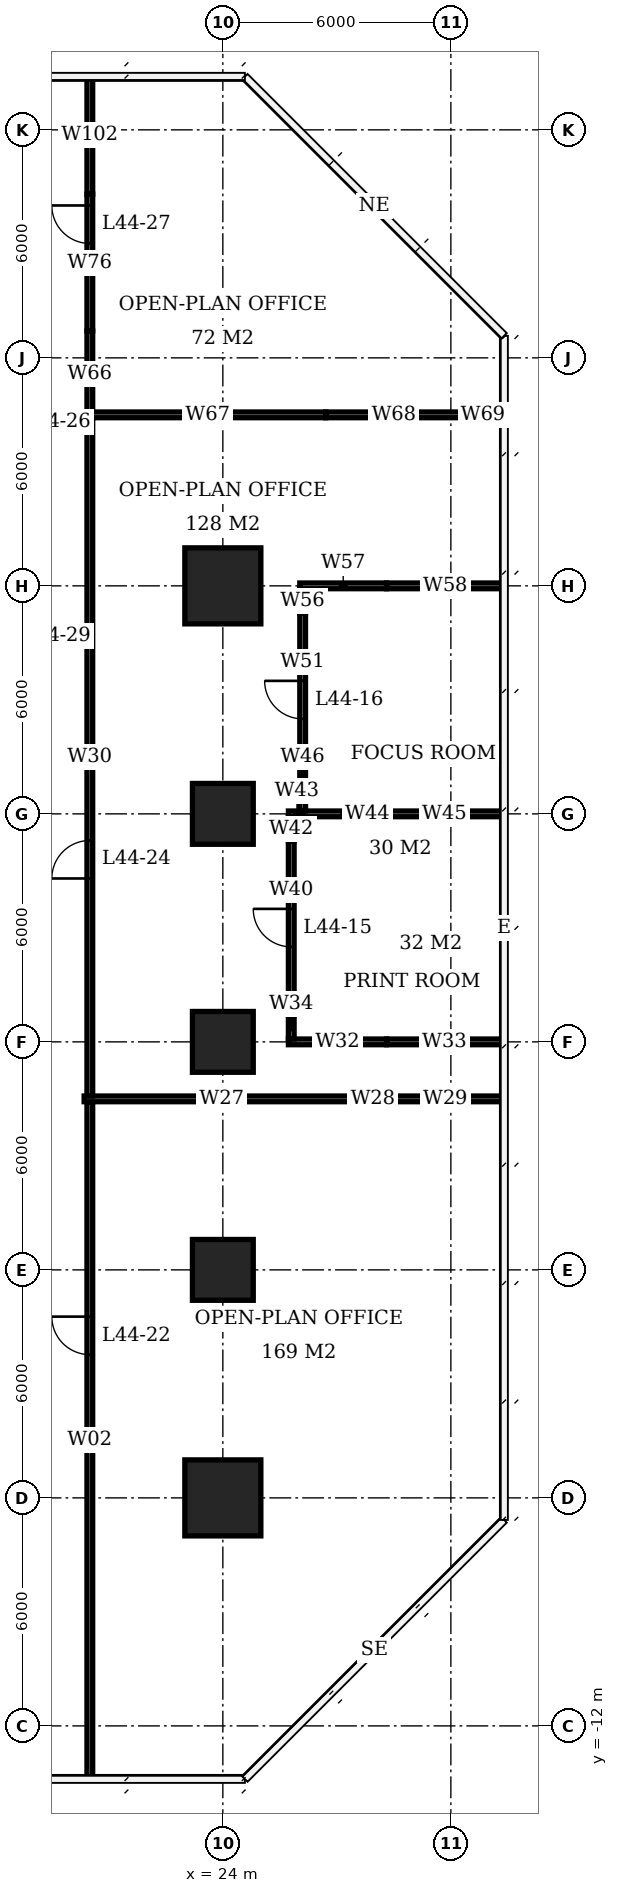
"""IFC4 building model, lengths in metres.
Left out: names, types, materials, properties, quantities, classifications, styles, units other than length and angle.
Written with IfcOpenShell. Run it as: python <this file> out.ifc"""

import sys

from ifc_helpers import new_model, si_unit, direction, frame, frame_2d, origin, origin_2d, place, context, subcontext, project, spatial, rectangle, extrude, element, fill, save


model = new_model("IFC4")
c1 = context("Model", 3, precision=1e-05, world=origin(), true_north=direction((0.0, 1.0)))
c2 = subcontext(c1, "Body", "Model", "MODEL_VIEW")
j1 = project(units=[si_unit("LENGTHUNIT", "METRE"), si_unit("PLANEANGLEUNIT", "RADIAN")], contexts=[c1])
p1 = place(None, origin())
s1 = spatial("IfcSite", under=j1, at=p1, CompositionType="ELEMENT")
p2 = place(p1, origin())
s2 = spatial("IfcBuilding", under=s1, at=p2, CompositionType="ELEMENT")
p3 = place(p2, frame((0.0, 0.0, 181.1)))
s3 = spatial("IfcBuildingStorey", under=s2, at=p3, CompositionType="ELEMENT", Elevation=181.1)
p4 = place(p3, frame((24.0, -6.0, 0.0), z_axis=(0.0, 0.0, 1.0), x_axis=(1.0, 0.0, 0.0)))
e1 = element("IfcColumn", 1, at=p4, inside=s3, PredefinedType="COLUMN", context=c2, shape_type="SweptSolid", body=[
    extrude(rectangle(XDim=2.0, YDim=2.0, at=origin_2d()), origin(), (0.0, 0.0, 1.0), 3.9),
])
for number, where, z_axis, x_axis in (
    (2, (24.0, 0.0, 0.0), (0.0, 0.0, 1.0), (1.0, 0.0, 0.0)),
    (3, (24.0, 6.0, 0.0), (0.0, 0.0, 1.0), (1.0, 0.0, 0.0)),
    (4, (24.0, 12.0, 0.0), (0.0, 0.0, 1.0), (1.0, 0.0, 0.0)),
):
    element("IfcColumn", number, at=place(p3, frame(where, z_axis=z_axis, x_axis=x_axis)), inside=s3, PredefinedType="COLUMN", context=c2, shape_type="SweptSolid", body=[
        extrude(rectangle(XDim=1.6, YDim=1.6, at=origin_2d()), origin(), (0.0, 0.0, 1.0), 3.9),
    ])
p5 = place(p3, frame((24.0, 18.0, 0.0), z_axis=(0.0, 0.0, 1.0), x_axis=(1.0, 0.0, 0.0)))
e5 = element("IfcColumn", 5, at=p5, inside=s3, PredefinedType="COLUMN", context=c2, shape_type="SweptSolid", body=[
    extrude(rectangle(XDim=2.0, YDim=2.0, at=origin_2d()), origin(), (0.0, 0.0, 1.0), 3.9),
])
p6 = place(p3, frame((25.725, 6.0, 0.0), z_axis=(0.0, 0.0, 1.0), x_axis=(1.0, 0.0, 0.0)))
e6 = element("IfcWall", 6, at=p6, inside=s3, PredefinedType="PARTITIONING", context=c2, shape_type="SweptSolid", body=[
    extrude(rectangle(XDim=2.585, YDim=0.15, at=frame_2d((1.292, 0.0))), origin(), (0.0, 0.0, 1.0), 2.65),
])
p7 = place(p3, frame((28.31, 6.0, 0.0), z_axis=(0.0, 0.0, 1.0), x_axis=(1.0, 0.0, 0.0)))
e7 = element("IfcWall", 7, at=p7, inside=s3, PredefinedType="PARTITIONING", context=c2, shape_type="SweptSolid", body=[
    extrude(rectangle(XDim=3.04, YDim=0.15, at=frame_2d((1.52, 0.0))), origin(), (0.0, 0.0, 1.0), 3.65),
])
p8 = place(p3, frame((25.725, 12.0, 0.0), z_axis=(0.0, 0.0, 1.0), x_axis=(1.0, 0.0, 0.0)))
e8 = element("IfcWall", 8, at=p8, inside=s3, PredefinedType="PARTITIONING", context=c2, shape_type="SweptSolid", body=[
    extrude(rectangle(XDim=0.45, YDim=0.15, at=frame_2d((0.225, 0.0))), origin(), (0.0, 0.0, 1.0), 2.65),
])
p9 = place(p3, frame((26.1, 12.0, 0.0), z_axis=(0.0, 0.0, 1.0), x_axis=(1.0, 0.0, 0.0)))
e9 = element("IfcWall", 9, at=p9, inside=s3, PredefinedType="PARTITIONING", context=c2, shape_type="SweptSolid", body=[
    extrude(rectangle(XDim=2.21, YDim=0.15, at=frame_2d((1.105, 0.0))), origin(), (0.0, 0.0, 1.0), 2.65),
])
p10 = place(p3, frame((28.31, 12.0, 0.0), z_axis=(0.0, 0.0, 1.0), x_axis=(1.0, 0.0, 0.0)))
e10 = element("IfcWall", 10, at=p10, inside=s3, PredefinedType="PARTITIONING", context=c2, shape_type="SweptSolid", body=[
    extrude(rectangle(XDim=3.04, YDim=0.15, at=frame_2d((1.52, 0.0))), origin(), (0.0, 0.0, 1.0), 3.65),
])
p11 = place(p3, frame((26.025, 18.0, 0.0), z_axis=(0.0, 0.0, 1.0), x_axis=(1.0, 0.0, 0.0)))
e11 = element("IfcWall", 11, at=p11, inside=s3, PredefinedType="PARTITIONING", context=c2, shape_type="SweptSolid", body=[
    extrude(rectangle(XDim=2.285, YDim=0.15, at=frame_2d((1.143, 0.0))), origin(), (0.0, 0.0, 1.0), 2.65),
])
p12 = place(p3, frame((28.31, 18.0, 0.0), z_axis=(0.0, 0.0, 1.0), x_axis=(1.0, 0.0, 0.0)))
e12 = element("IfcWall", 12, at=p12, inside=s3, PredefinedType="PARTITIONING", context=c2, shape_type="SweptSolid", body=[
    extrude(rectangle(XDim=3.09, YDim=0.15, at=frame_2d((1.545, 0.0))), origin(), (0.0, 0.0, 1.0), 3.65),
])
p13 = place(p3, frame((25.8, 6.075, 0.0), z_axis=(0.0, 0.0, 1.0), x_axis=(0.0, 1.0, 0.0)))
e13 = element("IfcWall", 13, at=p13, inside=s3, PredefinedType="PARTITIONING", context=c2, shape_type="SweptSolid", body=[
    extrude(rectangle(XDim=0.635, YDim=0.15, at=frame_2d((0.317, 0.0))), origin(), (0.0, 0.0, 1.0), 2.65),
])
p14 = place(p3, frame((25.8, 6.71, 0.0), z_axis=(0.0, 0.0, 1.0), x_axis=(0.0, 1.0, 0.0)))
e14 = element("IfcWall", 14, at=p14, inside=s3, PredefinedType="PARTITIONING", context=c2, shape_type="SweptSolid", body=[
    extrude(rectangle(XDim=4.58, YDim=0.15, at=frame_2d((2.29, 0.0))), origin(), (0.0, 0.0, 1.0), 3.65),
])
p15 = place(p14, frame((1.79, 0.0, 0.0)))
e15 = element("IfcOpeningElement", 15, at=p15, cuts=e14, PredefinedType="OPENING", context=c2, shape_type="SweptSolid", body=[
    extrude(rectangle(XDim=1.0, YDim=2.1, at=frame_2d((0.5, 1.05))), frame((0.0, 0.085, 0.0), z_axis=(0.0, -1.0, 0.0), x_axis=(1.0, 0.0, 0.0)), (0.0, 0.0, 1.0), 0.17),
])
for number, where, z_axis, x_axis in (
    (16, (25.8, 11.29, 0.0), (0.0, 0.0, 1.0), (0.0, 1.0, 0.0)),
    (17, (26.1, 12.075, 0.0), (0.0, 0.0, 1.0), (0.0, 1.0, 0.0)),
):
    element("IfcWall", number, at=place(p3, frame(where, z_axis=z_axis, x_axis=x_axis)), inside=s3, PredefinedType="PARTITIONING", context=c2, shape_type="SweptSolid", body=[
        extrude(rectangle(XDim=0.635, YDim=0.15, at=frame_2d((0.317, 0.0))), origin(), (0.0, 0.0, 1.0), 2.65),
    ])
p16 = place(p3, frame((26.1, 12.71, 0.0), z_axis=(0.0, 0.0, 1.0), x_axis=(0.0, 1.0, 0.0)))
e18 = element("IfcWall", 18, at=p16, inside=s3, PredefinedType="PARTITIONING", context=c2, shape_type="SweptSolid", body=[
    extrude(rectangle(XDim=4.58, YDim=0.15, at=frame_2d((2.29, 0.0))), origin(), (0.0, 0.0, 1.0), 3.65),
])
p17 = place(p16, frame((1.79, 0.0, 0.0)))
e19 = element("IfcOpeningElement", 19, at=p17, cuts=e18, PredefinedType="OPENING", context=c2, shape_type="SweptSolid", body=[
    extrude(rectangle(XDim=1.0, YDim=2.1, at=frame_2d((0.5, 1.05))), frame((0.0, 0.085, 0.0), z_axis=(0.0, -1.0, 0.0), x_axis=(1.0, 0.0, 0.0)), (0.0, 0.0, 1.0), 0.17),
])
p18 = place(p3, frame((26.1, 17.29, 0.0), z_axis=(0.0, 0.0, 1.0), x_axis=(0.0, 1.0, 0.0)))
e20 = element("IfcWall", 20, at=p18, inside=s3, PredefinedType="PARTITIONING", context=c2, shape_type="SweptSolid", body=[
    extrude(rectangle(XDim=0.635, YDim=0.15, at=frame_2d((0.317, 0.0))), origin(), (0.0, 0.0, 1.0), 2.65),
])
p19 = place(p3, frame((20.5, -13.4, 0.0), z_axis=(0.0, 0.0, 1.0), x_axis=(0.0, 1.0, 0.0)))
e21 = element("IfcWall", 21, at=p19, inside=s3, PredefinedType="PARTITIONING", context=c2, shape_type="SweptSolid", body=[
    extrude(rectangle(XDim=17.825, YDim=0.15, at=frame_2d((8.913, 0.0))), origin(), (0.0, 0.0, 1.0), 3.65),
])
p20 = place(p19, frame((11.17, 0.0, 0.0)))
e22 = element("IfcOpeningElement", 22, at=p20, cuts=e21, PredefinedType="OPENING", context=c2, shape_type="SweptSolid", body=[
    extrude(rectangle(XDim=1.0, YDim=2.1, at=frame_2d((0.5, 1.05))), frame((0.0, 0.085, 0.0), z_axis=(0.0, -1.0, 0.0), x_axis=(1.0, 0.0, 0.0)), (0.0, 0.0, 1.0), 0.17),
])
p21 = place(p3, frame((20.5, 4.575, 0.0), z_axis=(0.0, 0.0, 1.0), x_axis=(0.0, 1.0, 0.0)))
e23 = element("IfcWall", 23, at=p21, inside=s3, PredefinedType="PARTITIONING", context=c2, shape_type="SweptSolid", body=[
    extrude(rectangle(XDim=17.85, YDim=0.15, at=frame_2d((8.925, 0.0))), origin(), (0.0, 0.0, 1.0), 3.65),
])
p22 = place(p21, frame((5.725, 0.0, 0.0)))
e24 = element("IfcOpeningElement", 24, at=p22, cuts=e23, PredefinedType="OPENING", context=c2, shape_type="SweptSolid", body=[
    extrude(rectangle(XDim=1.0, YDim=2.1, at=frame_2d((0.5, 1.05))), frame((0.0, 0.085, 0.0), z_axis=(0.0, -1.0, 0.0), x_axis=(1.0, 0.0, 0.0)), (0.0, 0.0, 1.0), 0.17),
])
p23 = place(p3, frame((20.35, 4.5, 0.0), z_axis=(0.0, 0.0, 1.0), x_axis=(1.0, 0.0, 0.0)))
e25 = element("IfcWall", 25, at=p23, inside=s3, PredefinedType="PARTITIONING", context=c2, shape_type="SweptSolid", body=[
    extrude(rectangle(XDim=7.24, YDim=0.15, at=frame_2d((3.62, 0.0))), origin(), (0.0, 0.0, 1.0), 3.65),
])
p24 = place(p3, frame((27.59, 4.5, 0.0), z_axis=(0.0, 0.0, 1.0), x_axis=(1.0, 0.0, 0.0)))
e26 = element("IfcWall", 26, at=p24, inside=s3, PredefinedType="PARTITIONING", context=c2, shape_type="SweptSolid", body=[
    extrude(rectangle(XDim=0.72, YDim=0.15, at=frame_2d((0.36, 0.0))), origin(), (0.0, 0.0, 1.0), 2.65),
])
p25 = place(p3, frame((28.31, 4.5, 0.0), z_axis=(0.0, 0.0, 1.0), x_axis=(1.0, 0.0, 0.0)))
e27 = element("IfcWall", 27, at=p25, inside=s3, PredefinedType="PARTITIONING", context=c2, shape_type="SweptSolid", body=[
    extrude(rectangle(XDim=3.09, YDim=0.15, at=frame_2d((1.545, 0.0))), origin(), (0.0, 0.0, 1.0), 3.65),
])
p26 = place(p3, frame((20.5, 22.425, 0.0), z_axis=(0.0, 0.0, 1.0), x_axis=(0.0, 1.0, 0.0)))
e28 = element("IfcWall", 28, at=p26, inside=s3, PredefinedType="PARTITIONING", context=c2, shape_type="SweptSolid", body=[
    extrude(rectangle(XDim=2.283, YDim=0.15, at=frame_2d((1.142, 0.0))), origin(), (0.0, 0.0, 1.0), 3.65),
])
p27 = place(p3, frame((20.5, 24.708, 0.0), z_axis=(0.0, 0.0, 1.0), x_axis=(0.0, 1.0, 0.0)))
e29 = element("IfcWall", 29, at=p27, inside=s3, PredefinedType="PARTITIONING", context=c2, shape_type="SweptSolid", body=[
    extrude(rectangle(XDim=3.602, YDim=0.15, at=frame_2d((1.801, 0.0))), origin(), (0.0, 0.0, 1.0), 2.65),
])
p28 = place(p27, frame((2.302, 0.0, 0.0)))
e30 = element("IfcOpeningElement", 30, at=p28, cuts=e29, PredefinedType="OPENING", context=c2, shape_type="SweptSolid", body=[
    extrude(rectangle(XDim=1.0, YDim=2.1, at=frame_2d((0.5, 1.05))), frame((0.0, 0.085, 0.0), z_axis=(0.0, -1.0, 0.0), x_axis=(1.0, 0.0, 0.0)), (0.0, 0.0, 1.0), 0.17),
])
p29 = place(p3, frame((20.5, 28.31, 0.0), z_axis=(0.0, 0.0, 1.0), x_axis=(0.0, 1.0, 0.0)))
e31 = element("IfcWall", 31, at=p29, inside=s3, PredefinedType="PARTITIONING", context=c2, shape_type="SweptSolid", body=[
    extrude(rectangle(XDim=3.09, YDim=0.15, at=frame_2d((1.545, 0.0))), origin(), (0.0, 0.0, 1.0), 3.65),
])
p30 = place(p3, frame((20.5, 22.5, 0.0), z_axis=(0.0, 0.0, 1.0), x_axis=(1.0, 0.0, 0.0)))
e32 = element("IfcWall", 32, at=p30, inside=s3, PredefinedType="PARTITIONING", context=c2, shape_type="SweptSolid", body=[
    extrude(rectangle(XDim=6.208, YDim=0.15, at=frame_2d((3.104, 0.0))), origin(), (0.0, 0.0, 1.0), 3.65),
])
p31 = place(p3, frame((26.708, 22.5, 0.0), z_axis=(0.0, 0.0, 1.0), x_axis=(1.0, 0.0, 0.0)))
e33 = element("IfcWall", 33, at=p31, inside=s3, PredefinedType="PARTITIONING", context=c2, shape_type="SweptSolid", body=[
    extrude(rectangle(XDim=3.584, YDim=0.15, at=frame_2d((1.792, 0.0))), origin(), (0.0, 0.0, 1.0), 2.65),
])
p32 = place(p3, frame((30.292, 22.5, 0.0), z_axis=(0.0, 0.0, 1.0), x_axis=(1.0, 0.0, 0.0)))
e34 = element("IfcWall", 34, at=p32, inside=s3, PredefinedType="PARTITIONING", context=c2, shape_type="SweptSolid", body=[
    extrude(rectangle(XDim=1.108, YDim=0.15, at=frame_2d((0.554, 0.0))), origin(), (0.0, 0.0, 1.0), 3.65),
])
p33 = place(p15, origin())
e35 = element("IfcDoor", 35, at=p33, inside=s3, OperationType="SINGLE_SWING_RIGHT", PredefinedType="DOOR", context=c2, shape_type="SweptSolid", body=[
    extrude(rectangle(XDim=1.0, YDim=2.1, at=frame_2d((0.5, 1.05))), frame((0.0, 0.025, 0.0), z_axis=(0.0, -1.0, 0.0), x_axis=(1.0, 0.0, 0.0)), (0.0, 0.0, 1.0), 0.05),
])
fill(e15, e35)
p34 = place(p17, origin())
e36 = element("IfcDoor", 36, at=p34, inside=s3, OperationType="SINGLE_SWING_RIGHT", PredefinedType="DOOR", context=c2, shape_type="SweptSolid", body=[
    extrude(rectangle(XDim=1.0, YDim=2.1, at=frame_2d((0.5, 1.05))), frame((0.0, 0.025, 0.0), z_axis=(0.0, -1.0, 0.0), x_axis=(1.0, 0.0, 0.0)), (0.0, 0.0, 1.0), 0.05),
])
fill(e19, e36)
p35 = place(p20, origin())
e37 = element("IfcDoor", 37, at=p35, inside=s3, OperationType="SINGLE_SWING_RIGHT", PredefinedType="DOOR", context=c2, shape_type="SweptSolid", body=[
    extrude(rectangle(XDim=1.0, YDim=2.1, at=frame_2d((0.5, 1.05))), frame((0.0, 0.025, 0.0), z_axis=(0.0, -1.0, 0.0), x_axis=(1.0, 0.0, 0.0)), (0.0, 0.0, 1.0), 0.05),
])
fill(e22, e37)
p36 = place(p22, origin())
e38 = element("IfcDoor", 38, at=p36, inside=s3, OperationType="SINGLE_SWING_LEFT", PredefinedType="DOOR", context=c2, shape_type="SweptSolid", body=[
    extrude(rectangle(XDim=1.0, YDim=2.1, at=frame_2d((0.5, 1.05))), frame((0.0, 0.025, 0.0), z_axis=(0.0, -1.0, 0.0), x_axis=(1.0, 0.0, 0.0)), (0.0, 0.0, 1.0), 0.05),
])
fill(e24, e38)
p37 = place(p28, origin())
e39 = element("IfcDoor", 39, at=p37, inside=s3, OperationType="SINGLE_SWING_RIGHT", PredefinedType="DOOR", context=c2, shape_type="SweptSolid", body=[
    extrude(rectangle(XDim=1.0, YDim=2.1, at=frame_2d((0.5, 1.05))), frame((0.0, 0.025, 0.0), z_axis=(0.0, -1.0, 0.0), x_axis=(1.0, 0.0, 0.0)), (0.0, 0.0, 1.0), 0.05),
])
fill(e30, e39)
save(model, sys.argv[1])
